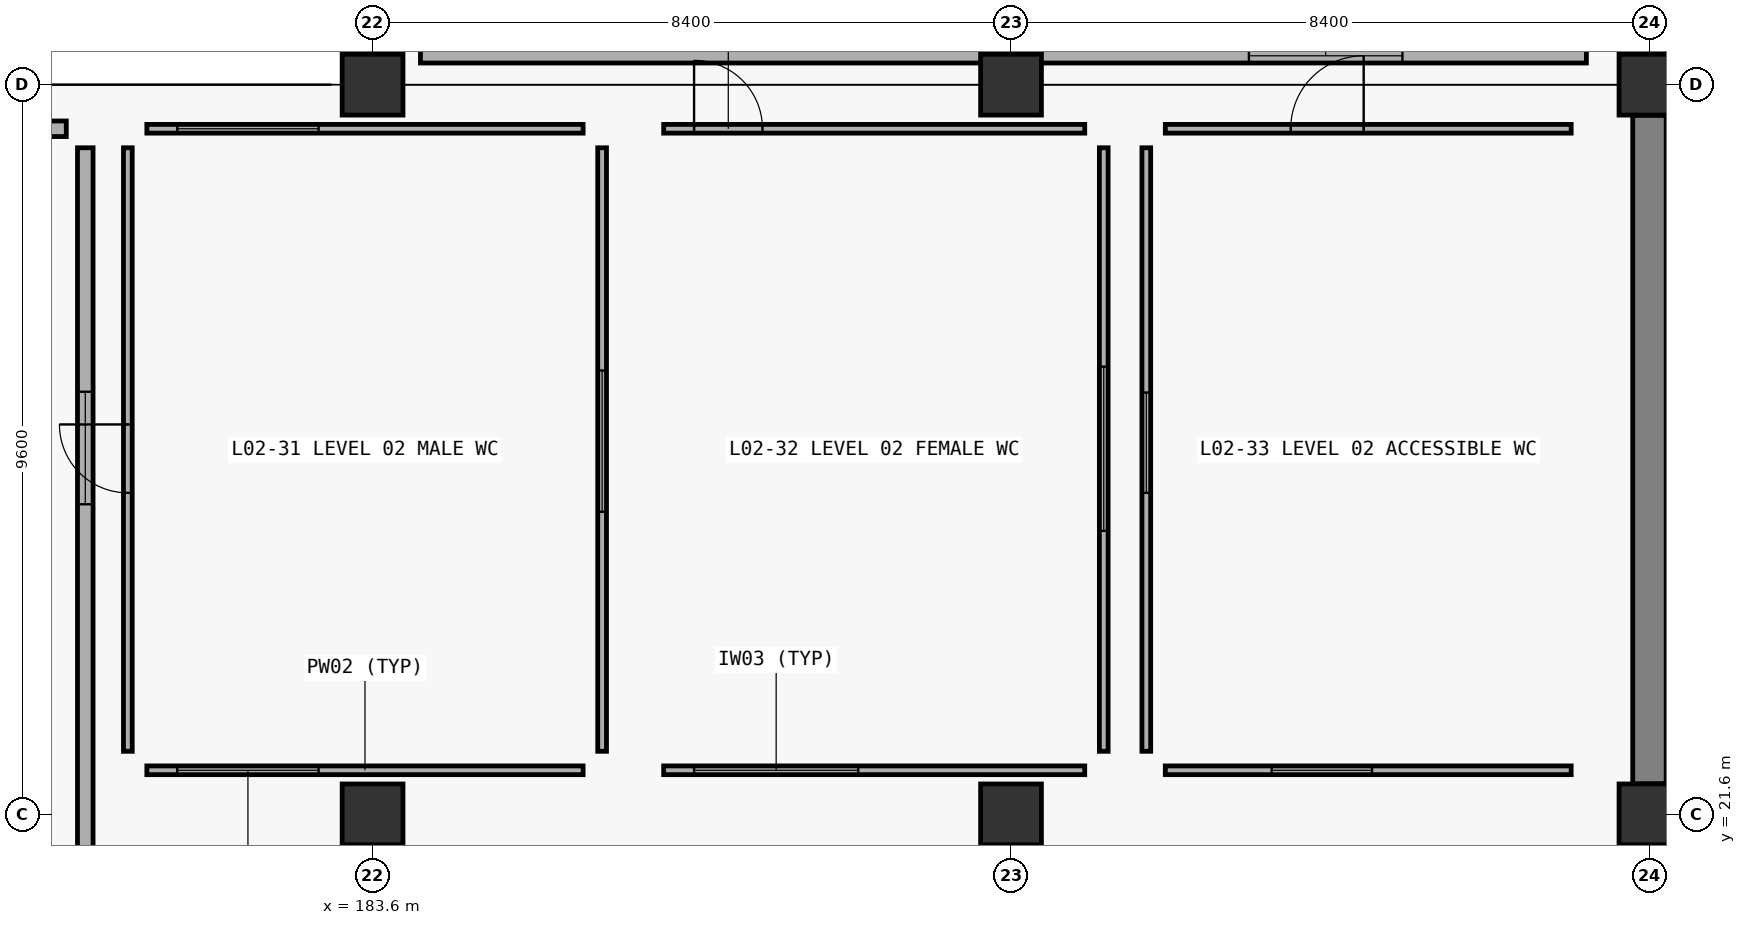
"""IFC4 building model, lengths in metres.
Left out: names, types, materials, properties, quantities, classifications, styles, units other than length and angle.
Written with IfcOpenShell. Run it as: python <this file> out.ifc"""

import sys

from ifc_helpers import new_model, si_unit, direction, frame, frame_2d, origin, origin_2d, place, context, subcontext, project, spatial, rectangle, extrude, element, fill, save


model = new_model("IFC4")
c1 = context("Model", 3, precision=1e-05, world=origin(), true_north=direction((0.0, 1.0)))
c2 = subcontext(c1, "Body", "Model", "MODEL_VIEW")
j1 = project(units=[si_unit("LENGTHUNIT", "METRE"), si_unit("PLANEANGLEUNIT", "RADIAN")], contexts=[c1])
p1 = place(None, origin())
s1 = spatial("IfcSite", under=j1, at=p1, CompositionType="ELEMENT")
p2 = place(p1, origin())
s2 = spatial("IfcBuilding", under=s1, at=p2, CompositionType="ELEMENT")
p3 = place(p2, frame((0.0, 0.0, 10.5)))
s3 = spatial("IfcBuildingStorey", under=s2, at=p3, CompositionType="ELEMENT", Elevation=10.5)
for number, where, z_axis, x_axis in (
    (1, (183.6, 21.6, 0.0), (0.0, 0.0, 1.0), (1.0, 0.0, 0.0)),
    (2, (183.6, 31.2, 0.0), (0.0, 0.0, 1.0), (1.0, 0.0, 0.0)),
    (3, (192.0, 21.6, 0.0), (0.0, 0.0, 1.0), (1.0, 0.0, 0.0)),
    (4, (192.0, 31.2, 0.0), (0.0, 0.0, 1.0), (1.0, 0.0, 0.0)),
    (5, (200.4, 21.6, 0.0), (0.0, 0.0, 1.0), (1.0, 0.0, 0.0)),
    (6, (200.4, 31.2, 0.0), (0.0, 0.0, 1.0), (1.0, 0.0, 0.0)),
):
    element("IfcColumn", number, at=place(p3, frame(where, z_axis=z_axis, x_axis=x_axis)), inside=s3, PredefinedType="COLUMN", context=c2, shape_type="SweptSolid", body=[
        extrude(rectangle(XDim=0.8, YDim=0.8, at=origin_2d()), origin(), (0.0, 0.0, 1.0), 5.1),
    ])
p4 = place(p3, frame((200.4, 13.602, 0.0), z_axis=(0.0, 0.0, 1.0), x_axis=(0.0, 1.0, 0.0)))
e7 = element("IfcWall", 7, at=p4, inside=s3, PredefinedType="SOLIDWALL", context=c2, shape_type="SweptSolid", body=[
    extrude(rectangle(XDim=7.596, YDim=0.44, at=frame_2d((3.798, 0.0))), origin(), (0.0, 0.0, 1.0), 4.3),
])
p5 = place(p3, frame((200.4, 22.002, 0.0), z_axis=(0.0, 0.0, 1.0), x_axis=(0.0, 1.0, 0.0)))
e8 = element("IfcWall", 8, at=p5, inside=s3, PredefinedType="SOLIDWALL", context=c2, shape_type="SweptSolid", body=[
    extrude(rectangle(XDim=8.796, YDim=0.44, at=frame_2d((4.398, 0.0))), origin(), (0.0, 0.0, 1.0), 4.3),
])
p6 = place(p3, frame((200.4, 31.602, 0.0), z_axis=(0.0, 0.0, 1.0), x_axis=(0.0, 1.0, 0.0)))
e9 = element("IfcWall", 9, at=p6, inside=s3, PredefinedType="SOLIDWALL", context=c2, shape_type="SweptSolid", body=[
    extrude(rectangle(XDim=8.796, YDim=0.44, at=frame_2d((4.398, 0.0))), origin(), (0.0, 0.0, 1.0), 4.3),
])
p7 = place(p3, frame((184.23, 31.58, 0.0), z_axis=(0.0, 0.0, 1.0), x_axis=(1.0, 0.0, 0.0)))
e10 = element("IfcWall", 10, at=p7, inside=s3, PredefinedType="PARTITIONING", context=c2, shape_type="SweptSolid", body=[
    extrude(rectangle(XDim=15.34, YDim=0.19, at=frame_2d((7.67, 0.0))), origin(), (0.0, 0.0, 1.0), 4.21),
])
p8 = place(p7, frame((10.9, 0.0, 0.9)))
e11 = element("IfcOpeningElement", 11, at=p8, cuts=e10, PredefinedType="OPENING", context=c2, shape_type="SweptSolid", body=[
    extrude(rectangle(XDim=2.02, YDim=1.32, at=frame_2d((1.01, 0.66))), frame((0.0, 0.105, 0.0), z_axis=(0.0, -1.0, 0.0), x_axis=(1.0, 0.0, 0.0)), (0.0, 0.0, 1.0), 0.21),
])
p9 = place(p3, frame((156.83, 30.62, 0.0), z_axis=(0.0, 0.0, 1.0), x_axis=(1.0, 0.0, 0.0)))
e12 = element("IfcWall", 12, at=p9, inside=s3, PredefinedType="PARTITIONING", context=c2, shape_type="SweptSolid", body=[
    extrude(rectangle(XDim=22.74, YDim=0.205, at=frame_2d((11.37, 0.0))), origin(), (0.0, 0.0, 1.0), 3.9),
])
p10 = place(p9, frame((13.4, 0.0, 0.9)))
e13 = element("IfcOpeningElement", 13, at=p10, cuts=e12, PredefinedType="OPENING", context=c2, shape_type="SweptSolid", body=[
    extrude(rectangle(XDim=1.48, YDim=1.35, at=frame_2d((0.74, 0.675))), frame((0.0, 0.113, 0.0), z_axis=(0.0, -1.0, 0.0), x_axis=(1.0, 0.0, 0.0)), (0.0, 0.0, 1.0), 0.225),
])
p11 = place(p3, frame((179.82, 14.03, 0.0), z_axis=(0.0, 0.0, 1.0), x_axis=(0.0, 1.0, 0.0)))
e14 = element("IfcWall", 14, at=p11, inside=s3, PredefinedType="PARTITIONING", context=c2, shape_type="SweptSolid", body=[
    extrude(rectangle(XDim=16.34, YDim=0.205, at=frame_2d((8.17, 0.0))), origin(), (0.0, 0.0, 1.0), 4.1),
])
p12 = place(p11, frame((11.65, 0.0, 0.9)))
e15 = element("IfcOpeningElement", 15, at=p12, cuts=e14, PredefinedType="OPENING", context=c2, shape_type="SweptSolid", body=[
    extrude(rectangle(XDim=1.48, YDim=1.35, at=frame_2d((0.74, 0.675))), frame((0.0, 0.113, 0.0), z_axis=(0.0, -1.0, 0.0), x_axis=(1.0, 0.0, 0.0)), (0.0, 0.0, 1.0), 0.225),
])
p13 = place(p3, frame((180.38, 22.43, 0.0), z_axis=(0.0, 0.0, 1.0), x_axis=(0.0, 1.0, 0.0)))
e16 = element("IfcWall", 16, at=p13, inside=s3, PredefinedType="PARTITIONING", context=c2, shape_type="SweptSolid", body=[
    extrude(rectangle(XDim=7.94, YDim=0.115, at=frame_2d((3.97, 0.0))), origin(), (0.0, 0.0, 1.0), 4.72),
])
p14 = place(p13, frame((3.4, 0.0, 0.0)))
e17 = element("IfcOpeningElement", 17, at=p14, cuts=e16, PredefinedType="OPENING", context=c2, shape_type="SweptSolid", body=[
    extrude(rectangle(XDim=0.9, YDim=2.1, at=frame_2d((0.45, 1.05))), frame((0.0, 0.067, 0.0), z_axis=(0.0, -1.0, 0.0), x_axis=(1.0, 0.0, 0.0)), (0.0, 0.0, 1.0), 0.135),
])
p15 = place(p3, frame((180.63, 22.18, 0.0), z_axis=(0.0, 0.0, 1.0), x_axis=(1.0, 0.0, 0.0)))
e18 = element("IfcWall", 18, at=p15, inside=s3, PredefinedType="PARTITIONING", context=c2, shape_type="SweptSolid", body=[
    extrude(rectangle(XDim=5.74, YDim=0.115, at=frame_2d((2.87, 0.0))), origin(), (0.0, 0.0, 1.0), 3.9),
])
p16 = place(p15, frame((0.4, 0.0, 0.9)))
e19 = element("IfcOpeningElement", 19, at=p16, cuts=e18, PredefinedType="OPENING", context=c2, shape_type="SweptSolid", body=[
    extrude(rectangle(XDim=1.86, YDim=1.28, at=frame_2d((0.93, 0.64))), frame((0.0, 0.067, 0.0), z_axis=(0.0, -1.0, 0.0), x_axis=(1.0, 0.0, 0.0)), (0.0, 0.0, 1.0), 0.135),
])
p17 = place(p3, frame((180.63, 30.62, 0.0), z_axis=(0.0, 0.0, 1.0), x_axis=(1.0, 0.0, 0.0)))
e20 = element("IfcWall", 20, at=p17, inside=s3, PredefinedType="PARTITIONING", context=c2, shape_type="SweptSolid", body=[
    extrude(rectangle(XDim=5.74, YDim=0.115, at=frame_2d((2.87, 0.0))), origin(), (0.0, 0.0, 1.0), 3.9),
])
p18 = place(p17, frame((0.4, 0.0, 0.9)))
e21 = element("IfcOpeningElement", 21, at=p18, cuts=e20, PredefinedType="OPENING", context=c2, shape_type="SweptSolid", body=[
    extrude(rectangle(XDim=1.86, YDim=1.28, at=frame_2d((0.93, 0.64))), frame((0.0, 0.067, 0.0), z_axis=(0.0, -1.0, 0.0), x_axis=(1.0, 0.0, 0.0)), (0.0, 0.0, 1.0), 0.135),
])
p19 = place(p3, frame((186.62, 22.43, 0.0), z_axis=(0.0, 0.0, 1.0), x_axis=(0.0, 1.0, 0.0)))
e22 = element("IfcWall", 22, at=p19, inside=s3, PredefinedType="PARTITIONING", context=c2, shape_type="SweptSolid", body=[
    extrude(rectangle(XDim=7.94, YDim=0.115, at=frame_2d((3.97, 0.0))), origin(), (0.0, 0.0, 1.0), 4.72),
])
p20 = place(p19, frame((3.15, 0.0, 0.9)))
e23 = element("IfcOpeningElement", 23, at=p20, cuts=e22, PredefinedType="OPENING", context=c2, shape_type="SweptSolid", body=[
    extrude(rectangle(XDim=1.86, YDim=1.28, at=frame_2d((0.93, 0.64))), frame((0.0, 0.067, 0.0), z_axis=(0.0, -1.0, 0.0), x_axis=(1.0, 0.0, 0.0)), (0.0, 0.0, 1.0), 0.135),
])
p21 = place(p3, frame((187.43, 30.62, 0.0), z_axis=(0.0, 0.0, 1.0), x_axis=(1.0, 0.0, 0.0)))
e24 = element("IfcWall", 24, at=p21, inside=s3, PredefinedType="PARTITIONING", context=c2, shape_type="SweptSolid", body=[
    extrude(rectangle(XDim=5.54, YDim=0.115, at=frame_2d((2.77, 0.0))), origin(), (0.0, 0.0, 1.0), 4.23),
])
p22 = place(p21, frame((0.4, 0.0, 0.0)))
e25 = element("IfcOpeningElement", 25, at=p22, cuts=e24, PredefinedType="OPENING", context=c2, shape_type="SweptSolid", body=[
    extrude(rectangle(XDim=0.9, YDim=2.1, at=frame_2d((0.45, 1.05))), frame((0.0, 0.067, 0.0), z_axis=(0.0, -1.0, 0.0), x_axis=(1.0, 0.0, 0.0)), (0.0, 0.0, 1.0), 0.135),
])
p23 = place(p3, frame((187.43, 22.18, 0.0), z_axis=(0.0, 0.0, 1.0), x_axis=(1.0, 0.0, 0.0)))
e26 = element("IfcWall", 26, at=p23, inside=s3, PredefinedType="PARTITIONING", context=c2, shape_type="SweptSolid", body=[
    extrude(rectangle(XDim=5.54, YDim=0.115, at=frame_2d((2.77, 0.0))), origin(), (0.0, 0.0, 1.0), 4.23),
])
p24 = place(p23, frame((0.4, 0.0, 0.9)))
e27 = element("IfcOpeningElement", 27, at=p24, cuts=e26, PredefinedType="OPENING", context=c2, shape_type="SweptSolid", body=[
    extrude(rectangle(XDim=2.16, YDim=1.42, at=frame_2d((1.08, 0.71))), frame((0.0, 0.067, 0.0), z_axis=(0.0, -1.0, 0.0), x_axis=(1.0, 0.0, 0.0)), (0.0, 0.0, 1.0), 0.135),
])
p25 = place(p3, frame((193.22, 22.43, 0.0), z_axis=(0.0, 0.0, 1.0), x_axis=(0.0, 1.0, 0.0)))
e28 = element("IfcWall", 28, at=p25, inside=s3, PredefinedType="PARTITIONING", context=c2, shape_type="SweptSolid", body=[
    extrude(rectangle(XDim=7.94, YDim=0.115, at=frame_2d((3.97, 0.0))), origin(), (0.0, 0.0, 1.0), 4.72),
])
p26 = place(p25, frame((2.9, 0.0, 0.9)))
e29 = element("IfcOpeningElement", 29, at=p26, cuts=e28, PredefinedType="OPENING", context=c2, shape_type="SweptSolid", body=[
    extrude(rectangle(XDim=2.16, YDim=1.42, at=frame_2d((1.08, 0.71))), frame((0.0, 0.067, 0.0), z_axis=(0.0, -1.0, 0.0), x_axis=(1.0, 0.0, 0.0)), (0.0, 0.0, 1.0), 0.135),
])
p27 = place(p3, frame((194.03, 30.62, 0.0), z_axis=(0.0, 0.0, 1.0), x_axis=(1.0, 0.0, 0.0)))
e30 = element("IfcWall", 30, at=p27, inside=s3, PredefinedType="PARTITIONING", context=c2, shape_type="SweptSolid", body=[
    extrude(rectangle(XDim=5.34, YDim=0.115, at=frame_2d((2.67, 0.0))), origin(), (0.0, 0.0, 1.0), 4.37),
])
p28 = place(p27, frame((1.65, 0.0, 0.0)))
e31 = element("IfcOpeningElement", 31, at=p28, cuts=e30, PredefinedType="OPENING", context=c2, shape_type="SweptSolid", body=[
    extrude(rectangle(XDim=0.96, YDim=2.14, at=frame_2d((0.48, 1.07))), frame((0.0, 0.067, 0.0), z_axis=(0.0, -1.0, 0.0), x_axis=(1.0, 0.0, 0.0)), (0.0, 0.0, 1.0), 0.135),
])
p29 = place(p3, frame((194.03, 22.18, 0.0), z_axis=(0.0, 0.0, 1.0), x_axis=(1.0, 0.0, 0.0)))
e32 = element("IfcWall", 32, at=p29, inside=s3, PredefinedType="PARTITIONING", context=c2, shape_type="SweptSolid", body=[
    extrude(rectangle(XDim=5.34, YDim=0.115, at=frame_2d((2.67, 0.0))), origin(), (0.0, 0.0, 1.0), 4.37),
])
p30 = place(p29, frame((1.4, 0.0, 0.9)))
e33 = element("IfcOpeningElement", 33, at=p30, cuts=e32, PredefinedType="OPENING", context=c2, shape_type="SweptSolid", body=[
    extrude(rectangle(XDim=1.32, YDim=1.5, at=frame_2d((0.66, 0.75))), frame((0.0, 0.067, 0.0), z_axis=(0.0, -1.0, 0.0), x_axis=(1.0, 0.0, 0.0)), (0.0, 0.0, 1.0), 0.135),
])
p31 = place(p3, frame((193.78, 22.43, 0.0), z_axis=(0.0, 0.0, 1.0), x_axis=(0.0, 1.0, 0.0)))
e34 = element("IfcWall", 34, at=p31, inside=s3, PredefinedType="PARTITIONING", context=c2, shape_type="SweptSolid", body=[
    extrude(rectangle(XDim=7.94, YDim=0.115, at=frame_2d((3.97, 0.0))), origin(), (0.0, 0.0, 1.0), 4.72),
])
p32 = place(p31, frame((3.4, 0.0, 0.9)))
e35 = element("IfcOpeningElement", 35, at=p32, cuts=e34, PredefinedType="OPENING", context=c2, shape_type="SweptSolid", body=[
    extrude(rectangle(XDim=1.32, YDim=1.5, at=frame_2d((0.66, 0.75))), frame((0.0, 0.067, 0.0), z_axis=(0.0, -1.0, 0.0), x_axis=(1.0, 0.0, 0.0)), (0.0, 0.0, 1.0), 0.135),
])
p33 = place(p8, origin())
e36 = element("IfcWindow", 36, at=p33, inside=s3, PartitioningType="SINGLE_PANEL", PredefinedType="WINDOW", context=c2, shape_type="SweptSolid", body=[
    extrude(rectangle(XDim=2.02, YDim=1.32, at=frame_2d((1.01, 0.66))), frame((0.0, 0.03, 0.0), z_axis=(0.0, -1.0, 0.0), x_axis=(1.0, 0.0, 0.0)), (0.0, 0.0, 1.0), 0.06),
])
fill(e11, e36)
p34 = place(p12, origin())
e37 = element("IfcWindow", 37, at=p34, inside=s3, PartitioningType="SINGLE_PANEL", PredefinedType="WINDOW", context=c2, shape_type="SweptSolid", body=[
    extrude(rectangle(XDim=1.48, YDim=1.35, at=frame_2d((0.74, 0.675))), frame((0.0, 0.03, 0.0), z_axis=(0.0, -1.0, 0.0), x_axis=(1.0, 0.0, 0.0)), (0.0, 0.0, 1.0), 0.06),
])
fill(e15, e37)
p35 = place(p14, origin())
e38 = element("IfcDoor", 38, at=p35, inside=s3, OperationType="SINGLE_SWING_RIGHT", PredefinedType="DOOR", context=c2, shape_type="SweptSolid", body=[
    extrude(rectangle(XDim=0.9, YDim=2.1, at=frame_2d((0.45, 1.05))), frame((0.0, 0.025, 0.0), z_axis=(0.0, -1.0, 0.0), x_axis=(1.0, 0.0, 0.0)), (0.0, 0.0, 1.0), 0.05),
])
fill(e17, e38)
p36 = place(p16, origin())
e39 = element("IfcWindow", 39, at=p36, inside=s3, PartitioningType="SINGLE_PANEL", PredefinedType="WINDOW", context=c2, shape_type="SweptSolid", body=[
    extrude(rectangle(XDim=1.86, YDim=1.28, at=frame_2d((0.93, 0.64))), frame((0.0, 0.03, 0.0), z_axis=(0.0, -1.0, 0.0), x_axis=(1.0, 0.0, 0.0)), (0.0, 0.0, 1.0), 0.06),
])
fill(e19, e39)
p37 = place(p18, origin())
e40 = element("IfcWindow", 40, at=p37, inside=s3, PartitioningType="SINGLE_PANEL", PredefinedType="WINDOW", context=c2, shape_type="SweptSolid", body=[
    extrude(rectangle(XDim=1.86, YDim=1.28, at=frame_2d((0.93, 0.64))), frame((0.0, 0.03, 0.0), z_axis=(0.0, -1.0, 0.0), x_axis=(1.0, 0.0, 0.0)), (0.0, 0.0, 1.0), 0.06),
])
fill(e21, e40)
p38 = place(p20, origin())
e41 = element("IfcWindow", 41, at=p38, inside=s3, PartitioningType="SINGLE_PANEL", PredefinedType="WINDOW", context=c2, shape_type="SweptSolid", body=[
    extrude(rectangle(XDim=1.86, YDim=1.28, at=frame_2d((0.93, 0.64))), frame((0.0, 0.03, 0.0), z_axis=(0.0, -1.0, 0.0), x_axis=(1.0, 0.0, 0.0)), (0.0, 0.0, 1.0), 0.06),
])
fill(e23, e41)
p39 = place(p22, origin())
e42 = element("IfcDoor", 42, at=p39, inside=s3, OperationType="SINGLE_SWING_LEFT", PredefinedType="DOOR", context=c2, shape_type="SweptSolid", body=[
    extrude(rectangle(XDim=0.9, YDim=2.1, at=frame_2d((0.45, 1.05))), frame((0.0, 0.025, 0.0), z_axis=(0.0, -1.0, 0.0), x_axis=(1.0, 0.0, 0.0)), (0.0, 0.0, 1.0), 0.05),
])
fill(e25, e42)
p40 = place(p24, origin())
e43 = element("IfcWindow", 43, at=p40, inside=s3, PartitioningType="SINGLE_PANEL", PredefinedType="WINDOW", context=c2, shape_type="SweptSolid", body=[
    extrude(rectangle(XDim=2.16, YDim=1.42, at=frame_2d((1.08, 0.71))), frame((0.0, 0.03, 0.0), z_axis=(0.0, -1.0, 0.0), x_axis=(1.0, 0.0, 0.0)), (0.0, 0.0, 1.0), 0.06),
])
fill(e27, e43)
p41 = place(p26, origin())
e44 = element("IfcWindow", 44, at=p41, inside=s3, PartitioningType="SINGLE_PANEL", PredefinedType="WINDOW", context=c2, shape_type="SweptSolid", body=[
    extrude(rectangle(XDim=2.16, YDim=1.42, at=frame_2d((1.08, 0.71))), frame((0.0, 0.03, 0.0), z_axis=(0.0, -1.0, 0.0), x_axis=(1.0, 0.0, 0.0)), (0.0, 0.0, 1.0), 0.06),
])
fill(e29, e44)
p42 = place(p28, origin())
e45 = element("IfcDoor", 45, at=p42, inside=s3, OperationType="SINGLE_SWING_RIGHT", PredefinedType="DOOR", context=c2, shape_type="SweptSolid", body=[
    extrude(rectangle(XDim=0.96, YDim=2.14, at=frame_2d((0.48, 1.07))), frame((0.0, 0.025, 0.0), z_axis=(0.0, -1.0, 0.0), x_axis=(1.0, 0.0, 0.0)), (0.0, 0.0, 1.0), 0.05),
])
fill(e31, e45)
p43 = place(p30, origin())
e46 = element("IfcWindow", 46, at=p43, inside=s3, PartitioningType="SINGLE_PANEL", PredefinedType="WINDOW", context=c2, shape_type="SweptSolid", body=[
    extrude(rectangle(XDim=1.32, YDim=1.5, at=frame_2d((0.66, 0.75))), frame((0.0, 0.03, 0.0), z_axis=(0.0, -1.0, 0.0), x_axis=(1.0, 0.0, 0.0)), (0.0, 0.0, 1.0), 0.06),
])
fill(e33, e46)
p44 = place(p32, origin())
e47 = element("IfcWindow", 47, at=p44, inside=s3, PartitioningType="SINGLE_PANEL", PredefinedType="WINDOW", context=c2, shape_type="SweptSolid", body=[
    extrude(rectangle(XDim=1.32, YDim=1.5, at=frame_2d((0.66, 0.75))), frame((0.0, 0.03, 0.0), z_axis=(0.0, -1.0, 0.0), x_axis=(1.0, 0.0, 0.0)), (0.0, 0.0, 1.0), 0.06),
])
fill(e35, e47)
save(model, sys.argv[1])
